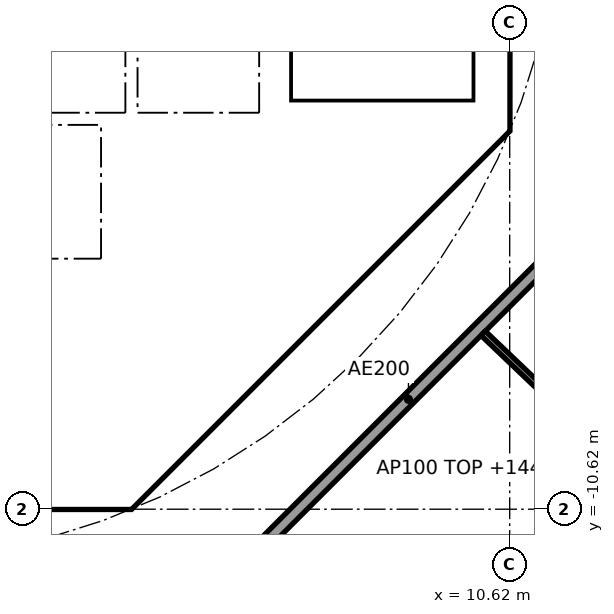
"""IFC4 building model, lengths in metres.
Left out: names, types, materials, properties, quantities, classifications, styles, units other than length and angle.
Written with IfcOpenShell. Run it as: python <this file> out.ifc"""

import sys

from ifc_helpers import new_model, si_unit, direction, frame, frame_2d, origin, place, context, subcontext, project, spatial, polyline, rectangle, outline, extrude, element, fill, save


model = new_model("IFC4")
c1 = context("Model", 3, precision=1e-05, world=origin(), true_north=direction((0.0, 1.0)))
c2 = subcontext(c1, "Body", "Model", "MODEL_VIEW")
j1 = project(units=[si_unit("LENGTHUNIT", "METRE"), si_unit("PLANEANGLEUNIT", "RADIAN")], contexts=[c1])
p1 = place(None, origin())
s1 = spatial("IfcSite", under=j1, at=p1, CompositionType="ELEMENT")
p2 = place(p1, origin())
s2 = spatial("IfcBuilding", under=s1, at=p2, CompositionType="ELEMENT")
p3 = place(p2, frame((0.0, 0.0, 141.8)))
s3 = spatial("IfcBuildingStorey", under=s2, at=p3, CompositionType="ELEMENT", Elevation=141.8)
p4 = place(p3, frame((4.613, -9.988, 0.0), z_axis=(0.0, 0.0, 1.0), x_axis=(0.707106781187, 0.707106781187, 0.0)))
e1 = element("IfcWall", 1, at=p4, inside=s3, PredefinedType="SHEAR", context=c2, shape_type="SweptSolid", body=[
    extrude(rectangle(XDim=7.602, YDim=0.6, at=frame_2d((3.801, 0.0))), origin(), (0.0, 0.0, 1.0), 3.44),
])
p5 = place(p4, frame((3.201, 0.0, 0.0)))
e2 = element("IfcOpeningElement", 2, at=p5, cuts=e1, PredefinedType="OPENING", context=c2, shape_type="SweptSolid", body=[
    extrude(rectangle(XDim=1.2, YDim=2.1, at=frame_2d((0.6, 1.05))), frame((0.0, 0.31, 0.0), z_axis=(0.0, -1.0, 0.0), x_axis=(1.0, 0.0, 0.0)), (0.0, 0.0, 1.0), 0.62),
])
p6 = place(p3, frame((4.0, -10.025, 0.0), z_axis=(0.0, 0.0, 1.0), x_axis=(0.0, 1.0, 0.0)))
e3 = element("IfcWall", 3, at=p6, inside=s3, PredefinedType="SOLIDWALL", context=c2, shape_type="SweptSolid", body=[
    extrude(rectangle(XDim=3.0, YDim=0.2, at=frame_2d((1.5, 0.0))), origin(), (0.0, 0.0, 1.0), 3.44),
])
p7 = place(p6, frame((0.975, 0.0, 0.0)))
e4 = element("IfcOpeningElement", 4, at=p7, cuts=e3, PredefinedType="OPENING", context=c2, shape_type="SweptSolid", body=[
    extrude(rectangle(XDim=1.1, YDim=2.1, at=frame_2d((0.55, 1.05))), frame((0.0, 0.11, 0.0), z_axis=(0.0, -1.0, 0.0), x_axis=(1.0, 0.0, 0.0)), (0.0, 0.0, 1.0), 0.22),
])
p8 = place(p3, frame((4.0, -6.5, 0.0), z_axis=(0.0, 0.0, 1.0), x_axis=(0.0, 1.0, 0.0)))
e5 = element("IfcWall", 5, at=p8, inside=s3, PredefinedType="SOLIDWALL", context=c2, shape_type="SweptSolid", body=[
    extrude(rectangle(XDim=2.2, YDim=0.2, at=frame_2d((1.1, 0.0))), origin(), (0.0, 0.0, 1.0), 3.44),
])
p9 = place(p8, frame((0.55, 0.0, 0.0)))
e6 = element("IfcOpeningElement", 6, at=p9, cuts=e5, PredefinedType="OPENING", context=c2, shape_type="SweptSolid", body=[
    extrude(rectangle(XDim=1.1, YDim=2.1, at=frame_2d((0.55, 1.05))), frame((0.0, 0.11, 0.0), z_axis=(0.0, -1.0, 0.0), x_axis=(1.0, 0.0, 0.0)), (0.0, 0.0, 1.0), 0.22),
])
p10 = place(p3, origin())
e7 = element("IfcWall", 7, at=p10, inside=s3, PredefinedType="SHEAR", context=c2, shape_type="SweptSolid", body=[
    extrude(outline(polyline([(-4.152, -10.025), (4.152, -10.025), (4.401, -9.776), (4.825, -10.2), (4.401, -10.625), (-4.401, -10.625), (-4.825, -10.2), (-4.401, -9.776), (-4.152, -10.025)])), origin(), (0.0, 0.0, 1.0), 3.44),
])
p11 = place(p3, origin())
e8 = element("IfcWall", 8, at=p11, inside=s3, PredefinedType="SHEAR", context=c2, shape_type="SweptSolid", body=[
    extrude(outline(polyline([(9.776, -4.401), (10.025, -4.152), (10.025, -3.801), (10.025, 4.152), (9.776, 4.401), (10.2, 4.825), (10.625, 4.401), (10.625, -4.401), (10.2, -4.825), (9.776, -4.401)])), origin(), (0.0, 0.0, 1.0), 3.44),
])
p12 = place(p3, origin())
e9 = element("IfcWall", 9, at=p12, inside=s3, PredefinedType="SOLIDWALL", context=c2, shape_type="SweptSolid", body=[
    extrude(outline(polyline([(-6.7, -2.1), (-6.5, -2.1), (-6.5, -4.1), (-4.5, -4.1), (-4.5, -2.1), (-4.3, -2.1), (-4.3, -4.1), (-2.3, -4.1), (-2.3, -2.1), (-2.1, -2.1), (-2.1, -4.1), (-0.1, -4.1), (-0.1, -2.1), (0.1, -2.1), (0.1, -4.1), (2.1, -4.1), (2.1, -2.1), (2.3, -2.1), (2.3, -4.1), (4.3, -4.1), (4.3, -2.1), (4.5, -2.1), (4.5, -4.1), (6.5, -4.1), (6.5, -2.1), (6.7, -2.1), (6.7, -4.3), (-6.7, -4.3), (-6.7, -2.1)])), origin(), (0.0, 0.0, 1.0), 3.44),
])
p13 = place(p3, origin())
e10 = element("IfcWall", 10, at=p13, inside=s3, PredefinedType="SOLIDWALL", context=c2, shape_type="SweptSolid", body=[
    extrude(outline(polyline([(4.1, -7.025), (-4.1, -7.025), (-4.1, -6.5), (4.1, -6.5), (4.1, -7.025)])), origin(), (0.0, 0.0, 1.0), 3.44),
])
p14 = place(p3, origin())
e11 = element("IfcWall", 11, at=p14, inside=s3, PredefinedType="SOLIDWALL", context=c2, shape_type="SweptSolid", body=[
    extrude(outline(polyline([(7.025, -3.9), (6.7, -3.9), (6.7, 3.9), (7.025, 3.9), (7.025, -3.9)])), origin(), (0.0, 0.0, 1.0), 3.44),
])
p15 = place(p3, origin())
e12 = element("IfcWall", 12, at=p15, inside=s3, PredefinedType="SOLIDWALL", context=c2, shape_type="SweptSolid", body=[
    extrude(outline(polyline([(10.025, -4.1), (6.7, -4.1), (6.7, -3.9), (10.025, -3.9), (10.025, -4.1)])), origin(), (0.0, 0.0, 1.0), 3.44),
])
p16 = place(p3, frame((5.275, -12.494, 0.0), z_axis=(0.0, 0.0, 1.0), x_axis=(0.707106781187, 0.707106781187, 0.0)))
e13 = element("IfcWall", 13, at=p16, inside=s3, PredefinedType="PARTITIONING", context=c2, shape_type="SweptSolid", body=[
    extrude(rectangle(XDim=10.409, YDim=0.2, at=frame_2d((5.205, 0.0))), origin(), (0.0, 0.0, 1.0), 3.44),
])
p17 = place(p3, frame((10.138, -14.026, 0.0), z_axis=(0.0, 0.0, 1.0), x_axis=(0.644051444483, 0.764982180746, 0.0)))
e14 = element("IfcWall", 14, at=p17, inside=s3, PredefinedType="PARTITIONING", context=c2, shape_type="SweptSolid", body=[
    extrude(rectangle(XDim=4.548, YDim=0.1, at=frame_2d((2.274, 0.0))), origin(), (0.0, 0.0, 1.0), 2.828),
])
p18 = place(p17, frame((2.986, 0.0, 0.0)))
e15 = element("IfcOpeningElement", 15, at=p18, cuts=e14, PredefinedType="OPENING", context=c2, shape_type="SweptSolid", body=[
    extrude(rectangle(XDim=0.9, YDim=2.1, at=frame_2d((0.45, 1.05))), frame((0.0, 0.06, 0.0), z_axis=(0.0, -1.0, 0.0), x_axis=(1.0, 0.0, 0.0)), (0.0, 0.0, 1.0), 0.12),
])
p19 = place(p3, frame((10.184, -7.727, 0.0), z_axis=(0.0, 0.0, 1.0), x_axis=(0.723654892782, -0.690162007179, 0.0)))
e16 = element("IfcWall", 16, at=p19, inside=s3, PredefinedType="PARTITIONING", context=c2, shape_type="SweptSolid", body=[
    extrude(rectangle(XDim=3.98, YDim=0.1, at=frame_2d((1.99, 0.0))), origin(), (0.0, 0.0, 1.0), 2.756),
])
p20 = place(p9, origin())
e17 = element("IfcDoor", 17, at=p20, inside=s3, OperationType="DOUBLE_DOOR_SLIDING", PredefinedType="DOOR", context=c2, shape_type="SweptSolid", body=[
    extrude(rectangle(XDim=1.1, YDim=2.1, at=frame_2d((0.55, 1.05))), frame((0.0, 0.025, 0.0), z_axis=(0.0, -1.0, 0.0), x_axis=(1.0, 0.0, 0.0)), (0.0, 0.0, 1.0), 0.05),
])
fill(e6, e17)
p21 = place(p7, origin())
e18 = element("IfcDoor", 18, at=p21, inside=s3, OperationType="SINGLE_SWING_RIGHT", PredefinedType="DOOR", context=c2, shape_type="SweptSolid", body=[
    extrude(rectangle(XDim=1.1, YDim=2.1, at=frame_2d((0.55, 1.05))), frame((0.0, 0.025, 0.0), z_axis=(0.0, -1.0, 0.0), x_axis=(1.0, 0.0, 0.0)), (0.0, 0.0, 1.0), 0.05),
])
fill(e4, e18)
p22 = place(p5, origin())
e19 = element("IfcDoor", 19, at=p22, inside=s3, OperationType="SINGLE_SWING_RIGHT", PredefinedType="DOOR", context=c2, shape_type="SweptSolid", body=[
    extrude(rectangle(XDim=1.2, YDim=2.1, at=frame_2d((0.6, 1.05))), frame((0.0, 0.025, 0.0), z_axis=(0.0, -1.0, 0.0), x_axis=(1.0, 0.0, 0.0)), (0.0, 0.0, 1.0), 0.05),
])
fill(e2, e19)
save(model, sys.argv[1])
